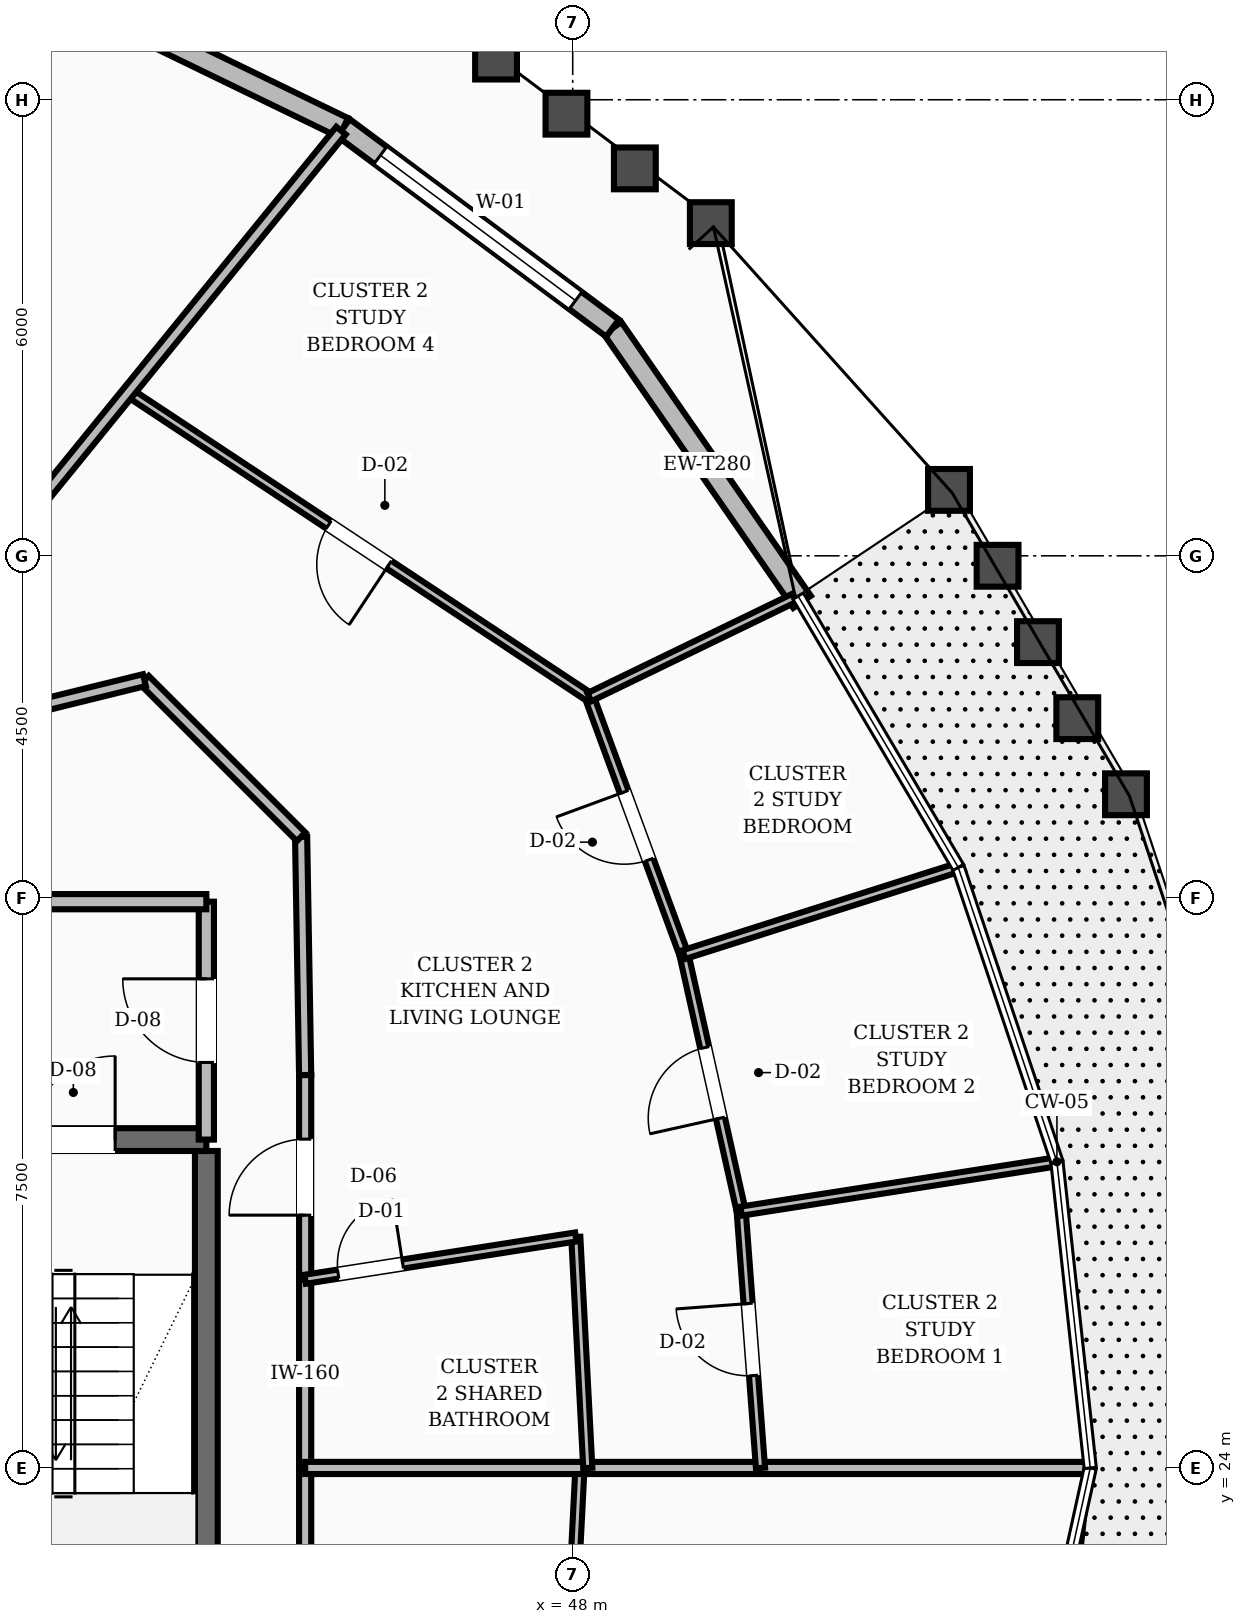
"""IFC4 building model, lengths in metres.
Left out: names, types, materials, properties, quantities, classifications, styles, units other than length and angle.
Written with IfcOpenShell. Run it as: python <this file> out.ifc"""

import sys

from ifc_helpers import new_model, si_unit, direction, frame, frame_2d, origin, place, context, subcontext, project, spatial, rectangle, extrude, element, fill, save


model = new_model("IFC4")
c1 = context("Model", 3, precision=1e-05, world=origin(), true_north=direction((0.0, 1.0)))
c2 = subcontext(c1, "Body", "Model", "MODEL_VIEW")
j1 = project(units=[si_unit("LENGTHUNIT", "METRE"), si_unit("PLANEANGLEUNIT", "RADIAN")], contexts=[c1])
p1 = place(None, origin())
s1 = spatial("IfcSite", under=j1, at=p1, CompositionType="ELEMENT")
p2 = place(p1, origin())
s2 = spatial("IfcBuilding", under=s1, at=p2, CompositionType="ELEMENT")
p3 = place(p2, frame((0.0, 0.0, 218.4)))
s3 = spatial("IfcBuildingStorey", under=s2, at=p3, CompositionType="ELEMENT", Elevation=218.4)
p4 = place(p3, frame((43.18, 19.43, 0.0), z_axis=(0.0, 0.0, 1.0), x_axis=(0.0, 1.0, 0.0)))
e1 = element("IfcWall", 1, at=p4, inside=s3, PredefinedType="SHEAR", context=c2, shape_type="SweptSolid", body=[
    extrude(rectangle(XDim=8.74, YDim=0.3, at=frame_2d((4.37, 0.0))), origin(), (0.0, 0.0, 1.0), 3.6),
])
p5 = place(p3, frame((39.58, 28.32, 0.0), z_axis=(0.0, 0.0, 1.0), x_axis=(1.0, 0.0, 0.0)))
e2 = element("IfcWall", 2, at=p5, inside=s3, PredefinedType="SHEAR", context=c2, shape_type="SweptSolid", body=[
    extrude(rectangle(XDim=3.6, YDim=0.3, at=frame_2d((1.8, 0.0))), origin(), (0.0, 0.0, 1.0), 3.6),
])
p6 = place(p5, frame((1.3, 0.0, 0.0)))
e3 = element("IfcOpeningElement", 3, at=p6, cuts=e2, PredefinedType="OPENING", context=c2, shape_type="SweptSolid", body=[
    extrude(rectangle(XDim=1.1, YDim=2.1, at=frame_2d((0.55, 1.05))), frame((0.0, 0.16, 0.0), z_axis=(0.0, -1.0, 0.0), x_axis=(1.0, 0.0, 0.0)), (0.0, 0.0, 1.0), 0.32),
])
p7 = place(p3, frame((51.017, 35.395, 0.0), z_axis=(0.0, 0.0, 1.0), x_axis=(-0.569267957894, 0.822152049267, 0.0)))
e4 = element("IfcWall", 4, at=p7, inside=s3, PredefinedType="STANDARD", context=c2, shape_type="SweptSolid", body=[
    extrude(rectangle(XDim=4.379, YDim=0.28, at=frame_2d((2.189, 0.0))), origin(), (0.0, 0.0, 1.0), 2.88),
])
p8 = place(p3, frame((48.524, 38.995, 0.0), z_axis=(0.0, 0.0, 1.0), x_axis=(-0.802005914902, 0.597316090912, 0.0)))
e5 = element("IfcWall", 5, at=p8, inside=s3, PredefinedType="STANDARD", context=c2, shape_type="SweptSolid", body=[
    extrude(rectangle(XDim=4.416, YDim=0.28, at=frame_2d((2.208, 0.0))), origin(), (0.0, 0.0, 1.0), 2.88),
])
p9 = place(p8, frame((0.608, 0.0, 0.8)))
e6 = element("IfcOpeningElement", 6, at=p9, cuts=e5, PredefinedType="OPENING", context=c2, shape_type="SweptSolid", body=[
    extrude(rectangle(XDim=3.2, YDim=1.65, at=frame_2d((1.6, 0.825))), frame((0.0, 0.15, 0.0), z_axis=(0.0, -1.0, 0.0), x_axis=(1.0, 0.0, 0.0)), (0.0, 0.0, 1.0), 0.3),
])
p10 = place(p3, frame((44.983, 41.633, 0.0), z_axis=(0.0, 0.0, 1.0), x_axis=(-0.899755886265, 0.436393566785, 0.0)))
e7 = element("IfcWall", 7, at=p10, inside=s3, PredefinedType="STANDARD", context=c2, shape_type="SweptSolid", body=[
    extrude(rectangle(XDim=4.49, YDim=0.28, at=frame_2d((2.245, 0.0))), origin(), (0.0, 0.0, 1.0), 2.88),
])
p11 = place(p3, frame((43.18, 28.32, 0.0), z_axis=(0.0, 0.0, 1.0), x_axis=(0.0, 1.0, 0.0)))
e8 = element("IfcWall", 8, at=p11, inside=s3, PredefinedType="SOLIDWALL", context=c2, shape_type="SweptSolid", body=[
    extrude(rectangle(XDim=3.13, YDim=0.2, at=frame_2d((1.565, 0.0))), origin(), (0.0, 0.0, 1.0), 2.87),
])
p12 = place(p11, frame((1.015, 0.0, 0.0)))
e9 = element("IfcOpeningElement", 9, at=p12, cuts=e8, PredefinedType="OPENING", context=c2, shape_type="SweptSolid", body=[
    extrude(rectangle(XDim=1.1, YDim=2.1, at=frame_2d((0.55, 1.05))), frame((0.0, 0.11, 0.0), z_axis=(0.0, -1.0, 0.0), x_axis=(1.0, 0.0, 0.0)), (0.0, 0.0, 1.0), 0.22),
])
p13 = place(p3, frame((39.2, 31.45, 0.0), z_axis=(0.0, 0.0, 1.0), x_axis=(1.0, 0.0, 0.0)))
e10 = element("IfcWall", 10, at=p13, inside=s3, PredefinedType="SOLIDWALL", context=c2, shape_type="SweptSolid", body=[
    extrude(rectangle(XDim=3.98, YDim=0.2, at=frame_2d((1.99, 0.0))), origin(), (0.0, 0.0, 1.0), 2.87),
])
p14 = place(p3, frame((44.48, 24.0, 0.0), z_axis=(0.0, 0.0, 1.0), x_axis=(0.0, 1.0, 0.0)))
e11 = element("IfcWall", 11, at=p14, inside=s3, PredefinedType="SOLIDWALL", context=c2, shape_type="SweptSolid", body=[
    extrude(rectangle(XDim=2.482, YDim=0.16, at=frame_2d((1.241, 0.0))), origin(), (0.0, 0.0, 1.0), 2.87),
])
p15 = place(p3, frame((44.48, 26.482, 0.0), z_axis=(0.0, 0.0, 1.0), x_axis=(0.0, 1.0, 0.0)))
e12 = element("IfcWall", 12, at=p15, inside=s3, PredefinedType="SOLIDWALL", context=c2, shape_type="SweptSolid", body=[
    extrude(rectangle(XDim=2.687, YDim=0.16, at=frame_2d((1.344, 0.0))), origin(), (0.0, 0.0, 1.0), 2.87),
])
p16 = place(p15, frame((0.844, 0.0, 0.0)))
e13 = element("IfcOpeningElement", 13, at=p16, cuts=e12, PredefinedType="OPENING", context=c2, shape_type="SweptSolid", body=[
    extrude(rectangle(XDim=1.0, YDim=2.1, at=frame_2d((0.5, 1.05))), frame((0.0, 0.09, 0.0), z_axis=(0.0, -1.0, 0.0), x_axis=(1.0, 0.0, 0.0)), (0.0, 0.0, 1.0), 0.18),
])
p17 = place(p3, frame((44.48, 29.169, 0.0), z_axis=(0.0, 0.0, 1.0), x_axis=(-0.016981035134, 0.999855811828, 0.0)))
e14 = element("IfcWall", 14, at=p17, inside=s3, PredefinedType="SOLIDWALL", context=c2, shape_type="SweptSolid", body=[
    extrude(rectangle(XDim=3.134, YDim=0.16, at=frame_2d((1.567, 0.0))), origin(), (0.0, 0.0, 1.0), 2.87),
])
p18 = place(p3, frame((44.427, 32.303, 0.0), z_axis=(0.0, 0.0, 1.0), x_axis=(-0.707106781187, 0.707106781187, 0.0)))
e15 = element("IfcWall", 15, at=p18, inside=s3, PredefinedType="SOLIDWALL", context=c2, shape_type="SweptSolid", body=[
    extrude(rectangle(XDim=2.916, YDim=0.16, at=frame_2d((1.458, 0.0))), origin(), (0.0, 0.0, 1.0), 2.87),
])
p19 = place(p3, frame((42.365, 34.365, 0.0), z_axis=(0.0, 0.0, 1.0), x_axis=(-0.970939799552, -0.239323850978, 0.0)))
e16 = element("IfcWall", 16, at=p19, inside=s3, PredefinedType="SOLIDWALL", context=c2, shape_type="SweptSolid", body=[
    extrude(rectangle(XDim=4.241, YDim=0.16, at=frame_2d((2.12, 0.0))), origin(), (0.0, 0.0, 1.0), 2.87),
])
p20 = place(p3, frame((44.48, 21.518, 0.0), z_axis=(0.0, 0.0, 1.0), x_axis=(0.0, 1.0, 0.0)))
e17 = element("IfcWall", 17, at=p20, inside=s3, PredefinedType="SOLIDWALL", context=c2, shape_type="SweptSolid", body=[
    extrude(rectangle(XDim=2.482, YDim=0.16, at=frame_2d((1.241, 0.0))), origin(), (0.0, 0.0, 1.0), 2.87),
])
p21 = place(p3, frame((47.942, 20.977, 0.0), z_axis=(0.0, 0.0, 1.0), x_axis=(0.050645517022, 0.998716692364, 0.0)))
e18 = element("IfcWall", 18, at=p21, inside=s3, PredefinedType="PARTITIONING", context=c2, shape_type="SweptSolid", body=[
    extrude(rectangle(XDim=3.027, YDim=0.12, at=frame_2d((1.514, 0.0))), origin(), (0.0, 0.0, 1.0), 2.87),
])
p22 = place(p3, frame((44.48, 24.0, 0.0), z_axis=(0.0, 0.0, 1.0), x_axis=(1.0, 0.0, 0.0)))
e19 = element("IfcWall", 19, at=p22, inside=s3, PredefinedType="SOLIDWALL", context=c2, shape_type="SweptSolid", body=[
    extrude(rectangle(XDim=10.279, YDim=0.16, at=frame_2d((5.139, 0.0))), origin(), (0.0, 0.0, 1.0), 2.87),
])
p23 = place(p3, frame((48.198, 24.0, 0.0), z_axis=(0.0, 0.0, 1.0), x_axis=(-0.051830297727, 0.998655906826, 0.0)))
e20 = element("IfcWall", 20, at=p23, inside=s3, PredefinedType="PARTITIONING", context=c2, shape_type="SweptSolid", body=[
    extrude(rectangle(XDim=3.043, YDim=0.12, at=frame_2d((1.521, 0.0))), origin(), (0.0, 0.0, 1.0), 2.87),
])
p24 = place(p3, frame((44.48, 26.482, 0.0), z_axis=(0.0, 0.0, 1.0), x_axis=(0.988009450348, 0.154393413147, 0.0)))
e21 = element("IfcWall", 21, at=p24, inside=s3, PredefinedType="PARTITIONING", context=c2, shape_type="SweptSolid", body=[
    extrude(rectangle(XDim=3.604, YDim=0.12, at=frame_2d((1.802, 0.0))), origin(), (0.0, 0.0, 1.0), 2.87),
])
p25 = place(p24, frame((0.44, 0.0, 0.0)))
e22 = element("IfcOpeningElement", 22, at=p25, cuts=e21, PredefinedType="OPENING", context=c2, shape_type="SweptSolid", body=[
    extrude(rectangle(XDim=0.86, YDim=2.1, at=frame_2d((0.43, 1.05))), frame((0.0, 0.07, 0.0), z_axis=(0.0, -1.0, 0.0), x_axis=(1.0, 0.0, 0.0)), (0.0, 0.0, 1.0), 0.14),
])
p26 = place(p3, frame((50.471, 24.0, 0.0), z_axis=(0.0, 0.0, 1.0), x_axis=(-0.075076534755, 0.997177774486, 0.0)))
e23 = element("IfcWall", 23, at=p26, inside=s3, PredefinedType="PARTITIONING", context=c2, shape_type="SweptSolid", body=[
    extrude(rectangle(XDim=3.388, YDim=0.12, at=frame_2d((1.694, 0.0))), origin(), (0.0, 0.0, 1.0), 2.87),
])
p27 = place(p26, frame((1.219, 0.0, 0.0)))
e24 = element("IfcOpeningElement", 24, at=p27, cuts=e23, PredefinedType="OPENING", context=c2, shape_type="SweptSolid", body=[
    extrude(rectangle(XDim=0.95, YDim=2.1, at=frame_2d((0.475, 1.05))), frame((0.0, 0.07, 0.0), z_axis=(0.0, -1.0, 0.0), x_axis=(1.0, 0.0, 0.0)), (0.0, 0.0, 1.0), 0.14),
])
p28 = place(p3, frame((50.216, 27.379, 0.0), z_axis=(0.0, 0.0, 1.0), x_axis=(-0.217670485925, 0.976022315092, 0.0)))
e25 = element("IfcWall", 25, at=p28, inside=s3, PredefinedType="PARTITIONING", context=c2, shape_type="SweptSolid", body=[
    extrude(rectangle(XDim=3.458, YDim=0.12, at=frame_2d((1.729, 0.0))), origin(), (0.0, 0.0, 1.0), 2.87),
])
p29 = place(p28, frame((1.254, 0.0, 0.0)))
e26 = element("IfcOpeningElement", 26, at=p29, cuts=e25, PredefinedType="OPENING", context=c2, shape_type="SweptSolid", body=[
    extrude(rectangle(XDim=0.95, YDim=2.1, at=frame_2d((0.475, 1.05))), frame((0.0, 0.07, 0.0), z_axis=(0.0, -1.0, 0.0), x_axis=(1.0, 0.0, 0.0)), (0.0, 0.0, 1.0), 0.14),
])
p30 = place(p3, frame((50.216, 27.379, 0.0), z_axis=(0.0, 0.0, 1.0), x_axis=(0.988012313849, 0.154375087639, 0.0)))
e27 = element("IfcWall", 27, at=p30, inside=s3, PredefinedType="PARTITIONING", context=c2, shape_type="SweptSolid", body=[
    extrude(rectangle(XDim=4.155, YDim=0.12, at=frame_2d((2.077, 0.0))), origin(), (0.0, 0.0, 1.0), 2.87),
])
p31 = place(p3, frame((49.464, 30.754, 0.0), z_axis=(0.0, 0.0, 1.0), x_axis=(-0.345027950541, 0.938592410659, 0.0)))
e28 = element("IfcWall", 28, at=p31, inside=s3, PredefinedType="PARTITIONING", context=c2, shape_type="SweptSolid", body=[
    extrude(rectangle(XDim=3.608, YDim=0.12, at=frame_2d((1.804, 0.0))), origin(), (0.0, 0.0, 1.0), 2.87),
])
p32 = place(p31, frame((1.329, 0.0, 0.0)))
e29 = element("IfcOpeningElement", 29, at=p32, cuts=e28, PredefinedType="OPENING", context=c2, shape_type="SweptSolid", body=[
    extrude(rectangle(XDim=0.95, YDim=2.1, at=frame_2d((0.475, 1.05))), frame((0.0, 0.07, 0.0), z_axis=(0.0, -1.0, 0.0), x_axis=(1.0, 0.0, 0.0)), (0.0, 0.0, 1.0), 0.14),
])
p33 = place(p3, frame((49.464, 30.754, 0.0), z_axis=(0.0, 0.0, 1.0), x_axis=(0.953007258162, 0.302947463913, 0.0)))
e30 = element("IfcWall", 30, at=p33, inside=s3, PredefinedType="PARTITIONING", context=c2, shape_type="SweptSolid", body=[
    extrude(rectangle(XDim=3.737, YDim=0.12, at=frame_2d((1.868, 0.0))), origin(), (0.0, 0.0, 1.0), 2.87),
])
p34 = place(p3, frame((48.219, 34.14, 0.0), z_axis=(0.0, 0.0, 1.0), x_axis=(-0.833915165303, 0.551892649957, 0.0)))
e31 = element("IfcWall", 31, at=p34, inside=s3, PredefinedType="PARTITIONING", context=c2, shape_type="SweptSolid", body=[
    extrude(rectangle(XDim=7.272, YDim=0.12, at=frame_2d((3.636, 0.0))), origin(), (0.0, 0.0, 1.0), 2.87),
])
p35 = place(p34, frame((3.161, 0.0, 0.0)))
e32 = element("IfcOpeningElement", 32, at=p35, cuts=e31, PredefinedType="OPENING", context=c2, shape_type="SweptSolid", body=[
    extrude(rectangle(XDim=0.95, YDim=2.1, at=frame_2d((0.475, 1.05))), frame((0.0, 0.07, 0.0), z_axis=(0.0, -1.0, 0.0), x_axis=(1.0, 0.0, 0.0)), (0.0, 0.0, 1.0), 0.14),
])
p36 = place(p3, frame((48.219, 34.14, 0.0), z_axis=(0.0, 0.0, 1.0), x_axis=(0.899937935562, 0.436018018133, 0.0)))
e33 = element("IfcWall", 33, at=p36, inside=s3, PredefinedType="PARTITIONING", context=c2, shape_type="SweptSolid", body=[
    extrude(rectangle(XDim=3.001, YDim=0.12, at=frame_2d((1.5, 0.0))), origin(), (0.0, 0.0, 1.0), 2.87),
])
p37 = place(p3, frame((38.248, 33.35, 0.0), z_axis=(0.0, 0.0, 1.0), x_axis=(0.630915216518, 0.775851783246, 0.0)))
e34 = element("IfcWall", 34, at=p37, inside=s3, PredefinedType="SOLIDWALL", context=c2, shape_type="SweptSolid", body=[
    extrude(rectangle(XDim=10.625, YDim=0.16, at=frame_2d((5.313, 0.0))), origin(), (0.0, 0.0, 1.0), 2.87),
])
p38 = place(p9, origin())
e35 = element("IfcWindow", 35, at=p38, inside=s3, PartitioningType="SINGLE_PANEL", PredefinedType="WINDOW", context=c2, shape_type="SweptSolid", body=[
    extrude(rectangle(XDim=3.2, YDim=1.65, at=frame_2d((1.6, 0.825))), frame((0.0, 0.03, 0.0), z_axis=(0.0, -1.0, 0.0), x_axis=(1.0, 0.0, 0.0)), (0.0, 0.0, 1.0), 0.06),
])
fill(e6, e35)
p39 = place(p6, origin())
e36 = element("IfcDoor", 36, at=p39, inside=s3, OperationType="SINGLE_SWING_RIGHT", PredefinedType="DOOR", context=c2, shape_type="SweptSolid", body=[
    extrude(rectangle(XDim=1.1, YDim=2.1, at=frame_2d((0.55, 1.05))), frame((0.0, 0.025, 0.0), z_axis=(0.0, -1.0, 0.0), x_axis=(1.0, 0.0, 0.0)), (0.0, 0.0, 1.0), 0.05),
])
fill(e3, e36)
p40 = place(p12, origin())
e37 = element("IfcDoor", 37, at=p40, inside=s3, OperationType="SINGLE_SWING_RIGHT", PredefinedType="DOOR", context=c2, shape_type="SweptSolid", body=[
    extrude(rectangle(XDim=1.1, YDim=2.1, at=frame_2d((0.55, 1.05))), frame((0.0, 0.025, 0.0), z_axis=(0.0, -1.0, 0.0), x_axis=(1.0, 0.0, 0.0)), (0.0, 0.0, 1.0), 0.05),
])
fill(e9, e37)
p41 = place(p25, origin())
e38 = element("IfcDoor", 38, at=p41, inside=s3, OperationType="SINGLE_SWING_RIGHT", PredefinedType="DOOR", context=c2, shape_type="SweptSolid", body=[
    extrude(rectangle(XDim=0.86, YDim=2.1, at=frame_2d((0.43, 1.05))), frame((0.0, 0.025, 0.0), z_axis=(0.0, -1.0, 0.0), x_axis=(1.0, 0.0, 0.0)), (0.0, 0.0, 1.0), 0.05),
])
fill(e22, e38)
p42 = place(p16, origin())
e39 = element("IfcDoor", 39, at=p42, inside=s3, OperationType="SINGLE_SWING_LEFT", PredefinedType="DOOR", context=c2, shape_type="SweptSolid", body=[
    extrude(rectangle(XDim=1.0, YDim=2.1, at=frame_2d((0.5, 1.05))), frame((0.0, 0.025, 0.0), z_axis=(0.0, -1.0, 0.0), x_axis=(1.0, 0.0, 0.0)), (0.0, 0.0, 1.0), 0.05),
])
fill(e13, e39)
p43 = place(p27, origin())
e40 = element("IfcDoor", 40, at=p43, inside=s3, OperationType="SINGLE_SWING_RIGHT", PredefinedType="DOOR", context=c2, shape_type="SweptSolid", body=[
    extrude(rectangle(XDim=0.95, YDim=2.1, at=frame_2d((0.475, 1.05))), frame((0.0, 0.025, 0.0), z_axis=(0.0, -1.0, 0.0), x_axis=(1.0, 0.0, 0.0)), (0.0, 0.0, 1.0), 0.05),
])
fill(e24, e40)
p44 = place(p29, origin())
e41 = element("IfcDoor", 41, at=p44, inside=s3, OperationType="SINGLE_SWING_LEFT", PredefinedType="DOOR", context=c2, shape_type="SweptSolid", body=[
    extrude(rectangle(XDim=0.95, YDim=2.1, at=frame_2d((0.475, 1.05))), frame((0.0, 0.025, 0.0), z_axis=(0.0, -1.0, 0.0), x_axis=(1.0, 0.0, 0.0)), (0.0, 0.0, 1.0), 0.05),
])
fill(e26, e41)
p45 = place(p32, origin())
e42 = element("IfcDoor", 42, at=p45, inside=s3, OperationType="SINGLE_SWING_RIGHT", PredefinedType="DOOR", context=c2, shape_type="SweptSolid", body=[
    extrude(rectangle(XDim=0.95, YDim=2.1, at=frame_2d((0.475, 1.05))), frame((0.0, 0.025, 0.0), z_axis=(0.0, -1.0, 0.0), x_axis=(1.0, 0.0, 0.0)), (0.0, 0.0, 1.0), 0.05),
])
fill(e29, e42)
p46 = place(p35, origin())
e43 = element("IfcDoor", 43, at=p46, inside=s3, OperationType="SINGLE_SWING_LEFT", PredefinedType="DOOR", context=c2, shape_type="SweptSolid", body=[
    extrude(rectangle(XDim=0.95, YDim=2.1, at=frame_2d((0.475, 1.05))), frame((0.0, 0.025, 0.0), z_axis=(0.0, -1.0, 0.0), x_axis=(1.0, 0.0, 0.0)), (0.0, 0.0, 1.0), 0.05),
])
fill(e32, e43)
save(model, sys.argv[1])
